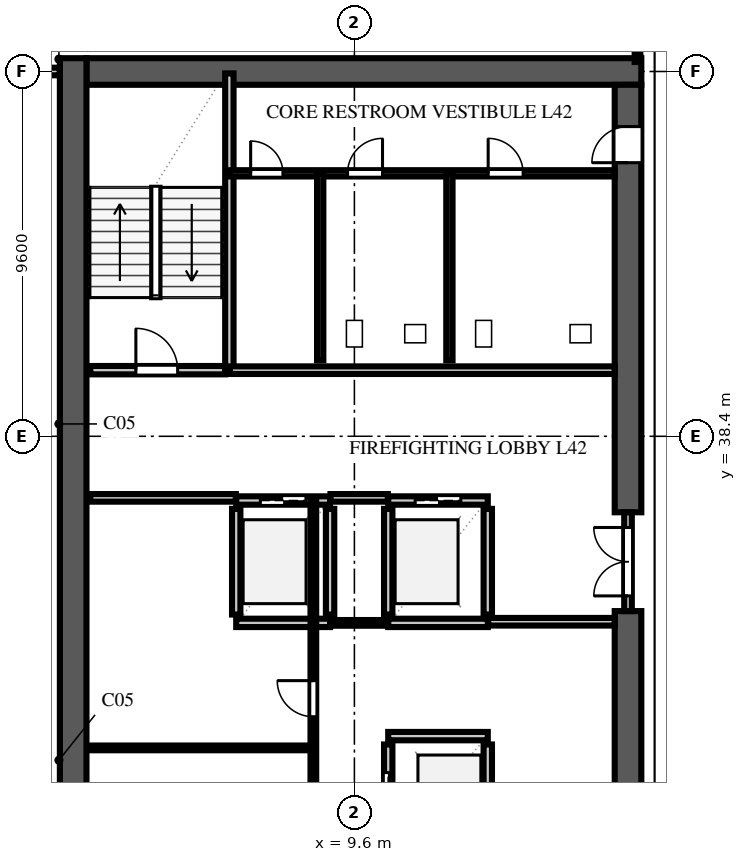
"""IFC4 building model, lengths in metres.
Left out: names, types, materials, properties, quantities, classifications, styles, units other than length and angle.
Written with IfcOpenShell. Run it as: python <this file> out.ifc"""

import sys

from ifc_helpers import new_model, si_unit, direction, frame, frame_2d, origin, place, context, subcontext, project, spatial, rectangle, extrude, element, fill, save


model = new_model("IFC4")
c1 = context("Model", 3, precision=1e-05, world=origin(), true_north=direction((0.0, 1.0)))
c2 = subcontext(c1, "Body", "Model", "MODEL_VIEW")
j1 = project(units=[si_unit("LENGTHUNIT", "METRE"), si_unit("PLANEANGLEUNIT", "RADIAN")], contexts=[c1])
p1 = place(None, origin())
s1 = spatial("IfcSite", under=j1, at=p1, CompositionType="ELEMENT")
p2 = place(p1, origin())
s2 = spatial("IfcBuilding", under=s1, at=p2, CompositionType="ELEMENT")
p3 = place(p2, frame((0.0, 0.0, 167.4)))
s3 = spatial("IfcBuildingStorey", under=s2, at=p3, CompositionType="ELEMENT", Elevation=167.4)
p4 = place(p3, frame((2.55, 48.0, 0.0), z_axis=(0.0, 0.0, 1.0), x_axis=(1.0, 0.0, 0.0)))
e1 = element("IfcWall", 1, at=p4, inside=s3, PredefinedType="SHEAR", context=c2, shape_type="SweptSolid", body=[
    extrude(rectangle(XDim=14.6, YDim=0.7, at=frame_2d((7.3, 0.0))), origin(), (0.0, 0.0, 1.0), 3.54),
])
p5 = place(p3, frame((2.2, 9.25, 0.0), z_axis=(0.0, 0.0, 1.0), x_axis=(0.0, 1.0, 0.0)))
e2 = element("IfcWall", 2, at=p5, inside=s3, PredefinedType="SHEAR", context=c2, shape_type="SweptSolid", body=[
    extrude(rectangle(XDim=39.1, YDim=0.7, at=frame_2d((19.55, 0.0))), origin(), (0.0, 0.0, 1.0), 3.54),
])
p6 = place(p3, frame((16.8, 26.0, 0.0), z_axis=(0.0, 0.0, 1.0), x_axis=(0.0, 1.0, 0.0)))
e3 = element("IfcWall", 3, at=p6, inside=s3, PredefinedType="SHEAR", context=c2, shape_type="SweptSolid", body=[
    extrude(rectangle(XDim=7.8, YDim=0.7, at=frame_2d((3.9, 0.0))), origin(), (0.0, 0.0, 1.0), 3.54),
])
p7 = place(p3, frame((16.8, 36.4, 0.0), z_axis=(0.0, 0.0, 1.0), x_axis=(0.0, 1.0, 0.0)))
e4 = element("IfcWall", 4, at=p7, inside=s3, PredefinedType="SHEAR", context=c2, shape_type="SweptSolid", body=[
    extrude(rectangle(XDim=11.25, YDim=0.7, at=frame_2d((5.625, 0.0))), origin(), (0.0, 0.0, 1.0), 3.54),
])
p8 = place(p7, frame((9.2, 0.0, 0.0)))
e5 = element("IfcOpeningElement", 5, at=p8, cuts=e4, PredefinedType="OPENING", context=c2, shape_type="SweptSolid", body=[
    extrude(rectangle(XDim=0.95, YDim=2.15, at=frame_2d((0.475, 1.075))), frame((0.0, 0.362, 0.0), z_axis=(0.0, -1.0, 0.0), x_axis=(1.0, 0.0, 0.0)), (0.0, 0.0, 1.0), 0.724),
])
p9 = place(p3, frame((2.65, 40.14, 0.0), z_axis=(0.0, 0.0, 1.0), x_axis=(1.0, 0.0, 0.0)))
e6 = element("IfcWall", 6, at=p9, inside=s3, PredefinedType="SOLIDWALL", context=c2, shape_type="SweptSolid", body=[
    extrude(rectangle(XDim=3.55, YDim=0.22, at=frame_2d((1.775, 0.0))), origin(), (0.0, 0.0, 1.0), 3.54),
])
p10 = place(p9, frame((1.2, 0.0, 0.0)))
e7 = element("IfcOpeningElement", 7, at=p10, cuts=e6, PredefinedType="OPENING", context=c2, shape_type="SweptSolid", body=[
    extrude(rectangle(XDim=1.1, YDim=2.2, at=frame_2d((0.55, 1.1))), frame((0.0, 0.122, 0.0), z_axis=(0.0, -1.0, 0.0), x_axis=(1.0, 0.0, 0.0)), (0.0, 0.0, 1.0), 0.244),
])
p11 = place(p3, frame((6.31, 40.14, 0.0), z_axis=(0.0, 0.0, 1.0), x_axis=(0.0, 1.0, 0.0)))
e8 = element("IfcWall", 8, at=p11, inside=s3, PredefinedType="SOLIDWALL", context=c2, shape_type="SweptSolid", body=[
    extrude(rectangle(XDim=7.81, YDim=0.22, at=frame_2d((3.905, 0.0))), origin(), (0.0, 0.0, 1.0), 3.54),
])
p12 = place(p3, frame((10.49, 27.71, 0.0), z_axis=(0.0, 0.0, 1.0), x_axis=(0.0, 1.0, 0.0)))
e9 = element("IfcWall", 9, at=p12, inside=s3, PredefinedType="SOLIDWALL", context=c2, shape_type="SweptSolid", body=[
    extrude(rectangle(XDim=2.58, YDim=0.22, at=frame_2d((1.29, 0.0))), origin(), (0.0, 0.0, 1.0), 3.54),
])
p13 = place(p12, frame((0.74, 0.0, 0.0)))
e10 = element("IfcOpeningElement", 10, at=p13, cuts=e9, PredefinedType="OPENING", context=c2, shape_type="SweptSolid", body=[
    extrude(rectangle(XDim=1.1, YDim=2.2, at=frame_2d((0.55, 1.1))), frame((0.0, 0.122, 0.0), z_axis=(0.0, -1.0, 0.0), x_axis=(1.0, 0.0, 0.0)), (0.0, 0.0, 1.0), 0.244),
])
p14 = place(p3, frame((13.11, 27.71, 0.0), z_axis=(0.0, 0.0, 1.0), x_axis=(0.0, 1.0, 0.0)))
e11 = element("IfcWall", 11, at=p14, inside=s3, PredefinedType="SOLIDWALL", context=c2, shape_type="SweptSolid", body=[
    extrude(rectangle(XDim=2.58, YDim=0.22, at=frame_2d((1.29, 0.0))), origin(), (0.0, 0.0, 1.0), 3.54),
])
p15 = place(p3, frame((10.49, 30.51, 0.0), z_axis=(0.0, 0.0, 1.0), x_axis=(1.0, 0.0, 0.0)))
e12 = element("IfcWall", 12, at=p15, inside=s3, PredefinedType="SOLIDWALL", context=c2, shape_type="SweptSolid", body=[
    extrude(rectangle(XDim=2.62, YDim=0.22, at=frame_2d((1.31, 0.0))), origin(), (0.0, 0.0, 1.0), 3.54),
])
for number, where, z_axis, x_axis in (
    (13, (6.49, 33.71, 0.0), (0.0, 0.0, 1.0), (0.0, 1.0, 0.0)),
    (14, (8.96, 33.71, 0.0), (0.0, 0.0, 1.0), (0.0, 1.0, 0.0)),
):
    element("IfcWall", number, at=place(p3, frame(where, z_axis=z_axis, x_axis=x_axis)), inside=s3, PredefinedType="SOLIDWALL", context=c2, shape_type="SweptSolid", body=[
        extrude(rectangle(XDim=2.78, YDim=0.22, at=frame_2d((1.39, 0.0))), origin(), (0.0, 0.0, 1.0), 3.54),
    ])
p16 = place(p3, frame((6.49, 33.49, 0.0), z_axis=(0.0, 0.0, 1.0), x_axis=(1.0, 0.0, 0.0)))
e15 = element("IfcWall", 15, at=p16, inside=s3, PredefinedType="SOLIDWALL", context=c2, shape_type="SweptSolid", body=[
    extrude(rectangle(XDim=2.47, YDim=0.22, at=frame_2d((1.235, 0.0))), origin(), (0.0, 0.0, 1.0), 3.54),
])
p17 = place(p3, frame((6.49, 36.71, 0.0), z_axis=(0.0, 0.0, 1.0), x_axis=(1.0, 0.0, 0.0)))
e16 = element("IfcWall", 16, at=p17, inside=s3, PredefinedType="SOLIDWALL", context=c2, shape_type="SweptSolid", body=[
    extrude(rectangle(XDim=2.47, YDim=0.22, at=frame_2d((1.235, 0.0))), origin(), (0.0, 0.0, 1.0), 3.54),
])
p18 = place(p17, frame((0.635, 0.0, 0.0)))
e17 = element("IfcOpeningElement", 17, at=p18, cuts=e16, PredefinedType="OPENING", context=c2, shape_type="SweptSolid", body=[
    extrude(rectangle(XDim=1.2, YDim=2.2, at=frame_2d((0.6, 1.1))), frame((0.0, 0.122, 0.0), z_axis=(0.0, -1.0, 0.0), x_axis=(1.0, 0.0, 0.0)), (0.0, 0.0, 1.0), 0.244),
])
for number, where, z_axis, x_axis in (
    (18, (10.49, 33.71, 0.0), (0.0, 0.0, 1.0), (0.0, 1.0, 0.0)),
    (19, (13.11, 33.71, 0.0), (0.0, 0.0, 1.0), (0.0, 1.0, 0.0)),
):
    element("IfcWall", number, at=place(p3, frame(where, z_axis=z_axis, x_axis=x_axis)), inside=s3, PredefinedType="SOLIDWALL", context=c2, shape_type="SweptSolid", body=[
        extrude(rectangle(XDim=2.78, YDim=0.22, at=frame_2d((1.39, 0.0))), origin(), (0.0, 0.0, 1.0), 3.54),
    ])
p19 = place(p3, frame((10.49, 33.49, 0.0), z_axis=(0.0, 0.0, 1.0), x_axis=(1.0, 0.0, 0.0)))
e20 = element("IfcWall", 20, at=p19, inside=s3, PredefinedType="SOLIDWALL", context=c2, shape_type="SweptSolid", body=[
    extrude(rectangle(XDim=2.62, YDim=0.22, at=frame_2d((1.31, 0.0))), origin(), (0.0, 0.0, 1.0), 3.54),
])
p20 = place(p3, frame((10.49, 36.71, 0.0), z_axis=(0.0, 0.0, 1.0), x_axis=(1.0, 0.0, 0.0)))
e21 = element("IfcWall", 21, at=p20, inside=s3, PredefinedType="SOLIDWALL", context=c2, shape_type="SweptSolid", body=[
    extrude(rectangle(XDim=2.62, YDim=0.22, at=frame_2d((1.31, 0.0))), origin(), (0.0, 0.0, 1.0), 3.54),
])
p21 = place(p20, frame((0.71, 0.0, 0.0)))
e22 = element("IfcOpeningElement", 22, at=p21, cuts=e21, PredefinedType="OPENING", context=c2, shape_type="SweptSolid", body=[
    extrude(rectangle(XDim=1.2, YDim=2.2, at=frame_2d((0.6, 1.1))), frame((0.0, 0.122, 0.0), z_axis=(0.0, -1.0, 0.0), x_axis=(1.0, 0.0, 0.0)), (0.0, 0.0, 1.0), 0.244),
])
p22 = place(p3, frame((2.65, 36.78, 0.0), z_axis=(0.0, 0.0, 1.0), x_axis=(1.0, 0.0, 0.0)))
e23 = element("IfcWall", 23, at=p22, inside=s3, PredefinedType="SOLIDWALL", context=c2, shape_type="SweptSolid", body=[
    extrude(rectangle(XDim=3.83, YDim=0.2, at=frame_2d((1.915, 0.0))), origin(), (0.0, 0.0, 1.0), 3.54),
])
p23 = place(p3, frame((8.97, 36.78, 0.0), z_axis=(0.0, 0.0, 1.0), x_axis=(1.0, 0.0, 0.0)))
e24 = element("IfcWall", 24, at=p23, inside=s3, PredefinedType="SOLIDWALL", context=c2, shape_type="SweptSolid", body=[
    extrude(rectangle(XDim=1.51, YDim=0.2, at=frame_2d((0.755, 0.0))), origin(), (0.0, 0.0, 1.0), 3.54),
])
p24 = place(p3, frame((13.12, 33.52, 0.0), z_axis=(0.0, 0.0, 1.0), x_axis=(1.0, 0.0, 0.0)))
e25 = element("IfcWall", 25, at=p24, inside=s3, PredefinedType="SOLIDWALL", context=c2, shape_type="SweptSolid", body=[
    extrude(rectangle(XDim=3.33, YDim=0.2, at=frame_2d((1.665, 0.0))), origin(), (0.0, 0.0, 1.0), 3.54),
])
p25 = place(p3, frame((6.32, 40.14, 0.0), z_axis=(0.0, 0.0, 1.0), x_axis=(1.0, 0.0, 0.0)))
e26 = element("IfcWall", 26, at=p25, inside=s3, PredefinedType="SOLIDWALL", context=c2, shape_type="SweptSolid", body=[
    extrude(rectangle(XDim=10.13, YDim=0.2, at=frame_2d((5.065, 0.0))), origin(), (0.0, 0.0, 1.0), 3.54),
])
p26 = place(p3, frame((16.8, 33.8, 0.0), z_axis=(0.0, 0.0, 1.0), x_axis=(0.0, 1.0, 0.0)))
e27 = element("IfcWall", 27, at=p26, inside=s3, PredefinedType="SOLIDWALL", context=c2, shape_type="SweptSolid", body=[
    extrude(rectangle(XDim=2.6, YDim=0.2, at=frame_2d((1.3, 0.0))), origin(), (0.0, 0.0, 1.0), 3.54),
])
p27 = place(p26, frame((0.4, 0.0, 0.0)))
e28 = element("IfcOpeningElement", 28, at=p27, cuts=e27, PredefinedType="OPENING", context=c2, shape_type="SweptSolid", body=[
    extrude(rectangle(XDim=1.8, YDim=2.2, at=frame_2d((0.9, 1.1))), frame((0.0, 0.112, 0.0), z_axis=(0.0, -1.0, 0.0), x_axis=(1.0, 0.0, 0.0)), (0.0, 0.0, 1.0), 0.224),
])
p28 = place(p3, frame((8.965, 33.49, 0.0), z_axis=(0.0, 0.0, 1.0), x_axis=(1.0, 0.0, 0.0)))
e29 = element("IfcWall", 29, at=p28, inside=s3, PredefinedType="PARTITIONING", context=c2, shape_type="SweptSolid", body=[
    extrude(rectangle(XDim=1.52, YDim=0.15, at=frame_2d((0.76, 0.0))), origin(), (0.0, 0.0, 1.0), 3.54),
])
p29 = place(p3, frame((2.65, 30.2, 0.0), z_axis=(0.0, 0.0, 1.0), x_axis=(1.0, 0.0, 0.0)))
e30 = element("IfcWall", 30, at=p29, inside=s3, PredefinedType="PARTITIONING", context=c2, shape_type="SweptSolid", body=[
    extrude(rectangle(XDim=5.87, YDim=0.125, at=frame_2d((2.935, 0.0))), origin(), (0.0, 0.0, 1.0), 3.54),
])
p30 = place(p3, frame((8.52, 12.02, 0.0), z_axis=(0.0, 0.0, 1.0), x_axis=(0.0, 1.0, 0.0)))
e31 = element("IfcWall", 31, at=p30, inside=s3, PredefinedType="PARTITIONING", context=c2, shape_type="SweptSolid", body=[
    extrude(rectangle(XDim=24.76, YDim=0.15, at=frame_2d((12.38, 0.0))), origin(), (0.0, 0.0, 1.0), 3.54),
])
p31 = place(p30, frame((8.0, 0.0, 0.0)))
e32 = element("IfcOpeningElement", 32, at=p31, cuts=e31, PredefinedType="OPENING", context=c2, shape_type="SweptSolid", body=[
    extrude(rectangle(XDim=0.95, YDim=2.15, at=frame_2d((0.475, 1.075))), frame((0.0, 0.087, 0.0), z_axis=(0.0, -1.0, 0.0), x_axis=(1.0, 0.0, 0.0)), (0.0, 0.0, 1.0), 0.174),
])
p32 = place(p30, frame((19.0, 0.0, 0.0)))
e33 = element("IfcOpeningElement", 33, at=p32, cuts=e31, PredefinedType="OPENING", context=c2, shape_type="SweptSolid", body=[
    extrude(rectangle(XDim=0.95, YDim=2.15, at=frame_2d((0.475, 1.075))), frame((0.0, 0.087, 0.0), z_axis=(0.0, -1.0, 0.0), x_axis=(1.0, 0.0, 0.0)), (0.0, 0.0, 1.0), 0.174),
])
p33 = place(p3, frame((6.32, 45.32, 0.0), z_axis=(0.0, 0.0, 1.0), x_axis=(1.0, 0.0, 0.0)))
e34 = element("IfcWall", 34, at=p33, inside=s3, PredefinedType="PLUMBINGWALL", context=c2, shape_type="SweptSolid", body=[
    extrude(rectangle(XDim=10.13, YDim=0.165, at=frame_2d((5.065, 0.0))), origin(), (0.0, 0.0, 1.0), 3.54),
])
p34 = place(p33, frame((0.55, 0.0, 0.0)))
e35 = element("IfcOpeningElement", 35, at=p34, cuts=e34, PredefinedType="OPENING", context=c2, shape_type="SweptSolid", body=[
    extrude(rectangle(XDim=0.85, YDim=2.1, at=frame_2d((0.425, 1.05))), frame((0.0, 0.094, 0.0), z_axis=(0.0, -1.0, 0.0), x_axis=(1.0, 0.0, 0.0)), (0.0, 0.0, 1.0), 0.189),
])
p35 = place(p33, frame((3.1, 0.0, 0.0)))
e36 = element("IfcOpeningElement", 36, at=p35, cuts=e34, PredefinedType="OPENING", context=c2, shape_type="SweptSolid", body=[
    extrude(rectangle(XDim=0.92, YDim=2.15, at=frame_2d((0.46, 1.075))), frame((0.0, 0.094, 0.0), z_axis=(0.0, -1.0, 0.0), x_axis=(1.0, 0.0, 0.0)), (0.0, 0.0, 1.0), 0.189),
])
p36 = place(p33, frame((6.8, 0.0, 0.0)))
e37 = element("IfcOpeningElement", 37, at=p36, cuts=e34, PredefinedType="OPENING", context=c2, shape_type="SweptSolid", body=[
    extrude(rectangle(XDim=0.92, YDim=2.15, at=frame_2d((0.46, 1.075))), frame((0.0, 0.094, 0.0), z_axis=(0.0, -1.0, 0.0), x_axis=(1.0, 0.0, 0.0)), (0.0, 0.0, 1.0), 0.189),
])
for number, where, z_axis, x_axis in (
    (38, (8.7, 40.4, 0.0), (0.0, 0.0, 1.0), (0.0, 1.0, 0.0)),
    (39, (12.1, 40.4, 0.0), (0.0, 0.0, 1.0), (0.0, 1.0, 0.0)),
):
    element("IfcWall", number, at=place(p3, frame(where, z_axis=z_axis, x_axis=x_axis)), inside=s3, PredefinedType="PLUMBINGWALL", context=c2, shape_type="SweptSolid", body=[
        extrude(rectangle(XDim=4.92, YDim=0.165, at=frame_2d((2.46, 0.0))), origin(), (0.0, 0.0, 1.0), 3.54),
    ])
p37 = place(p3, frame((0.85, 48.0, 0.0), z_axis=(0.0, 0.0, 1.0), x_axis=(1.0, 0.0, 0.0)))
e40 = element("IfcWall", 40, at=p37, inside=s3, PredefinedType="SOLIDWALL", context=c2, shape_type="SweptSolid", body=[
    extrude(rectangle(XDim=0.995, YDim=0.2, at=frame_2d((0.498, 0.0))), origin(), (0.0, 0.0, 1.0), 3.54),
])
p38 = place(p3, frame((17.05, 48.25, 0.0), z_axis=(0.0, 0.0, 1.0), x_axis=(0.0, 1.0, 0.0)))
e41 = element("IfcWall", 41, at=p38, inside=s3, PredefinedType="PARTITIONING", context=c2, shape_type="SweptSolid", body=[
    extrude(rectangle(XDim=18.73, YDim=0.15, at=frame_2d((9.365, 0.0))), origin(), (0.0, 0.0, 1.0), 3.54),
])
p39 = place(p38, frame((3.4, 0.0, 0.0)))
e42 = element("IfcOpeningElement", 42, at=p39, cuts=e41, PredefinedType="OPENING", context=c2, shape_type="SweptSolid", body=[
    extrude(rectangle(XDim=0.95, YDim=2.15, at=frame_2d((0.475, 1.075))), frame((0.0, 0.087, 0.0), z_axis=(0.0, -1.0, 0.0), x_axis=(1.0, 0.0, 0.0)), (0.0, 0.0, 1.0), 0.174),
])
p40 = place(p10, origin())
e43 = element("IfcDoor", 43, at=p40, inside=s3, OperationType="SINGLE_SWING_LEFT", PredefinedType="DOOR", context=c2, shape_type="SweptSolid", body=[
    extrude(rectangle(XDim=1.1, YDim=2.2, at=frame_2d((0.55, 1.1))), frame((0.0, 0.025, 0.0), z_axis=(0.0, -1.0, 0.0), x_axis=(1.0, 0.0, 0.0)), (0.0, 0.0, 1.0), 0.05),
])
fill(e7, e43)
p41 = place(p13, origin())
e44 = element("IfcDoor", 44, at=p41, inside=s3, OperationType="DOUBLE_DOOR_SLIDING", PredefinedType="DOOR", context=c2, shape_type="SweptSolid", body=[
    extrude(rectangle(XDim=1.1, YDim=2.2, at=frame_2d((0.55, 1.1))), frame((0.0, 0.025, 0.0), z_axis=(0.0, -1.0, 0.0), x_axis=(1.0, 0.0, 0.0)), (0.0, 0.0, 1.0), 0.05),
])
fill(e10, e44)
p42 = place(p18, origin())
e45 = element("IfcDoor", 45, at=p42, inside=s3, OperationType="DOUBLE_DOOR_SLIDING", PredefinedType="DOOR", context=c2, shape_type="SweptSolid", body=[
    extrude(rectangle(XDim=1.2, YDim=2.2, at=frame_2d((0.6, 1.1))), frame((0.0, 0.025, 0.0), z_axis=(0.0, -1.0, 0.0), x_axis=(1.0, 0.0, 0.0)), (0.0, 0.0, 1.0), 0.05),
])
fill(e17, e45)
p43 = place(p21, origin())
e46 = element("IfcDoor", 46, at=p43, inside=s3, OperationType="DOUBLE_DOOR_SLIDING", PredefinedType="DOOR", context=c2, shape_type="SweptSolid", body=[
    extrude(rectangle(XDim=1.2, YDim=2.2, at=frame_2d((0.6, 1.1))), frame((0.0, 0.025, 0.0), z_axis=(0.0, -1.0, 0.0), x_axis=(1.0, 0.0, 0.0)), (0.0, 0.0, 1.0), 0.05),
])
fill(e22, e46)
p44 = place(p8, origin())
e47 = element("IfcDoor", 47, at=p44, inside=s3, OperationType="SINGLE_SWING_LEFT", PredefinedType="DOOR", context=c2, shape_type="SweptSolid", body=[
    extrude(rectangle(XDim=0.95, YDim=2.15, at=frame_2d((0.475, 1.075))), frame((0.0, 0.025, 0.0), z_axis=(0.0, -1.0, 0.0), x_axis=(1.0, 0.0, 0.0)), (0.0, 0.0, 1.0), 0.05),
])
fill(e5, e47)
p45 = place(p27, origin())
e48 = element("IfcDoor", 48, at=p45, inside=s3, OperationType="DOUBLE_DOOR_SINGLE_SWING", PredefinedType="DOOR", context=c2, shape_type="SweptSolid", body=[
    extrude(rectangle(XDim=1.8, YDim=2.2, at=frame_2d((0.9, 1.1))), frame((0.0, 0.025, 0.0), z_axis=(0.0, -1.0, 0.0), x_axis=(1.0, 0.0, 0.0)), (0.0, 0.0, 1.0), 0.05),
])
fill(e28, e48)
p46 = place(p32, origin())
e49 = element("IfcDoor", 49, at=p46, inside=s3, OperationType="SINGLE_SWING_RIGHT", PredefinedType="DOOR", context=c2, shape_type="SweptSolid", body=[
    extrude(rectangle(XDim=0.95, YDim=2.15, at=frame_2d((0.475, 1.075))), frame((0.0, 0.025, 0.0), z_axis=(0.0, -1.0, 0.0), x_axis=(1.0, 0.0, 0.0)), (0.0, 0.0, 1.0), 0.05),
])
fill(e33, e49)
p47 = place(p34, origin())
e50 = element("IfcDoor", 50, at=p47, inside=s3, OperationType="SINGLE_SWING_LEFT", PredefinedType="DOOR", context=c2, shape_type="SweptSolid", body=[
    extrude(rectangle(XDim=0.85, YDim=2.1, at=frame_2d((0.425, 1.05))), frame((0.0, 0.025, 0.0), z_axis=(0.0, -1.0, 0.0), x_axis=(1.0, 0.0, 0.0)), (0.0, 0.0, 1.0), 0.05),
])
fill(e35, e50)
p48 = place(p35, origin())
e51 = element("IfcDoor", 51, at=p48, inside=s3, OperationType="SINGLE_SWING_RIGHT", PredefinedType="DOOR", context=c2, shape_type="SweptSolid", body=[
    extrude(rectangle(XDim=0.92, YDim=2.15, at=frame_2d((0.46, 1.075))), frame((0.0, 0.025, 0.0), z_axis=(0.0, -1.0, 0.0), x_axis=(1.0, 0.0, 0.0)), (0.0, 0.0, 1.0), 0.05),
])
fill(e36, e51)
p49 = place(p36, origin())
e52 = element("IfcDoor", 52, at=p49, inside=s3, OperationType="SINGLE_SWING_LEFT", PredefinedType="DOOR", context=c2, shape_type="SweptSolid", body=[
    extrude(rectangle(XDim=0.92, YDim=2.15, at=frame_2d((0.46, 1.075))), frame((0.0, 0.025, 0.0), z_axis=(0.0, -1.0, 0.0), x_axis=(1.0, 0.0, 0.0)), (0.0, 0.0, 1.0), 0.05),
])
fill(e37, e52)
save(model, sys.argv[1])
